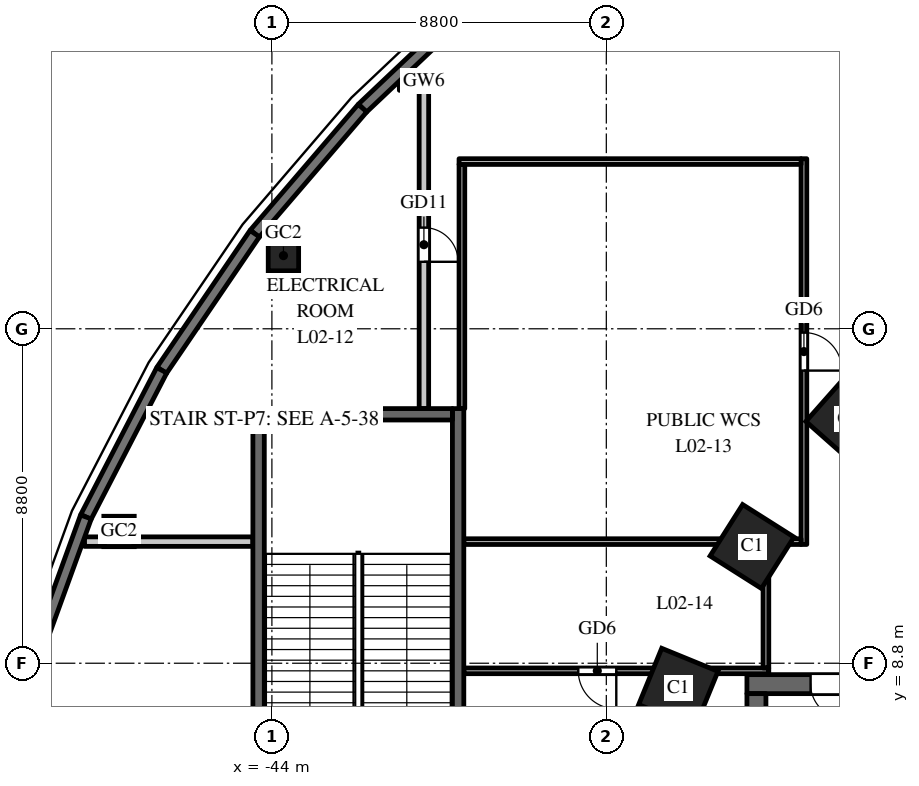
"""IFC4 building model, lengths in metres.
Left out: names, types, materials, properties, quantities, classifications, styles, units other than length and angle.
Written with IfcOpenShell. Run it as: python <this file> out.ifc"""

import sys

from ifc_helpers import new_model, si_unit, direction, frame, frame_2d, origin, origin_2d, place, context, subcontext, project, spatial, rectangle, hollow_rectangle, extrude, element, fill, save


model = new_model("IFC4")
c1 = context("Model", 3, precision=1e-05, world=origin(), true_north=direction((0.0, 1.0)))
c2 = subcontext(c1, "Body", "Model", "MODEL_VIEW")
j1 = project(units=[si_unit("LENGTHUNIT", "METRE"), si_unit("PLANEANGLEUNIT", "RADIAN")], contexts=[c1])
p1 = place(None, origin())
s1 = spatial("IfcSite", under=j1, at=p1, CompositionType="ELEMENT")
p2 = place(p1, origin())
s2 = spatial("IfcBuilding", under=s1, at=p2, CompositionType="ELEMENT")
p3 = place(p2, frame((0.0, 0.0, 13.5)))
s3 = spatial("IfcBuildingStorey", under=s2, at=p3, CompositionType="ELEMENT", Elevation=13.5)
for number, where, z_axis, x_axis in (
    (1, (-28.819, 15.23, 0.0), (0.0, 0.0, 1.0), (-0.663, -0.749, 0.0)),
    (2, (-31.365, 11.871, 0.0), (0.0, 0.0, 1.0), (-0.535, -0.845, 0.0)),
    (3, (-33.305, 8.149, 0.0), (0.0, 0.0, 1.0), (-0.379, -0.925, 0.0)),
):
    element("IfcColumn", number, at=place(p3, frame(where, z_axis=z_axis, x_axis=x_axis)), inside=s3, PredefinedType="COLUMN", context=c2, shape_type="SweptSolid", body=[
        extrude(rectangle(XDim=1.6, YDim=1.6, at=origin_2d()), origin(), (0.0, 0.0, 1.0), 6.0),
    ])
p4 = place(p3, frame((-16.5, 8.25, 0.0), z_axis=(0.0, 0.0, 1.0), x_axis=(-1.0, 0.0, 0.0)))
e4 = element("IfcWall", 4, at=p4, inside=s3, PredefinedType="SHEAR", context=c2, shape_type="SweptSolid", body=[
    extrude(rectangle(XDim=15.0, YDim=0.5, at=frame_2d((7.5, 0.0))), origin(), (0.0, 0.0, 1.0), 5.75),
])
p5 = place(p4, frame((6.9, 0.0, 0.0)))
e5 = element("IfcOpeningElement", 5, at=p5, cuts=e4, PredefinedType="OPENING", context=c2, shape_type="SweptSolid", body=[
    extrude(rectangle(XDim=1.2, YDim=2.1, at=frame_2d((0.6, 1.05))), frame((0.0, 0.26, 0.0), z_axis=(0.0, -1.0, 0.0), x_axis=(1.0, 0.0, 0.0)), (0.0, 0.0, 1.0), 0.52),
])
p6 = place(p4, frame((12.425, 0.0, 0.0)))
e6 = element("IfcOpeningElement", 6, at=p6, cuts=e4, PredefinedType="OPENING", context=c2, shape_type="SweptSolid", body=[
    extrude(rectangle(XDim=0.9, YDim=2.1, at=frame_2d((0.45, 1.05))), frame((0.0, 0.26, 0.0), z_axis=(0.0, -1.0, 0.0), x_axis=(1.0, 0.0, 0.0)), (0.0, 0.0, 1.0), 0.52),
])
p7 = place(p3, frame((-31.25, -8.0, 0.0), z_axis=(0.0, 0.0, 1.0), x_axis=(0.0, 1.0, 0.0)))
e7 = element("IfcWall", 7, at=p7, inside=s3, PredefinedType="SHEAR", context=c2, shape_type="SweptSolid", body=[
    extrude(rectangle(XDim=16.0, YDim=0.5, at=frame_2d((8.0, 0.0))), origin(), (0.0, 0.0, 1.0), 5.75),
])
for number, where, z_axis, x_axis in (
    (8, (-43.696, 19.525, 0.0), (0.0, 0.0, 1.0), (1.0, 0.0, 0.0)),
    (9, (-48.022, 12.267, 0.0), (0.0, 0.0, 1.0), (1.0, 0.0, 0.0)),
):
    element("IfcColumn", number, at=place(p3, frame(where, z_axis=z_axis, x_axis=x_axis)), inside=s3, PredefinedType="COLUMN", context=c2, shape_type="SweptSolid", body=[
        extrude(hollow_rectangle(XDim=0.8, YDim=0.8, WallThickness=0.04, at=origin_2d()), origin(), (0.0, 0.0, 1.0), 6.0),
    ])
p8 = place(p3, frame((-44.5, 12.0, 0.0), z_axis=(0.0, 0.0, 1.0), x_axis=(-1.0, 0.0, 0.0)))
e10 = element("IfcWall", 10, at=p8, inside=s3, PredefinedType="PARTITIONING", context=c2, shape_type="SweptSolid", body=[
    extrude(rectangle(XDim=4.43, YDim=0.25, at=frame_2d((2.215, 0.0))), origin(), (0.0, 0.0, 1.0), 5.15),
])
p9 = place(p3, frame((-40.646, 24.0, 0.0), z_axis=(0.0, 0.0, 1.0), x_axis=(1.0, 0.0, 0.0)))
e11 = element("IfcWall", 11, at=p9, inside=s3, PredefinedType="PARTITIONING", context=c2, shape_type="SweptSolid", body=[
    extrude(rectangle(XDim=0.521, YDim=0.25, at=frame_2d((0.26, 0.0))), origin(), (0.0, 0.0, 1.0), 5.75),
])
p10 = place(p3, frame((-40.0, 24.125, 0.0), z_axis=(0.0, 0.0, 1.0), x_axis=(0.0, -1.0, 0.0)))
e12 = element("IfcWall", 12, at=p10, inside=s3, PredefinedType="PARTITIONING", context=c2, shape_type="SweptSolid", body=[
    extrude(rectangle(XDim=8.625, YDim=0.25, at=frame_2d((4.312, 0.0))), origin(), (0.0, 0.0, 1.0), 4.75),
])
p11 = place(p10, frame((3.863, 0.0, 0.0)))
e13 = element("IfcOpeningElement", 13, at=p11, cuts=e12, PredefinedType="OPENING", context=c2, shape_type="SweptSolid", body=[
    extrude(rectangle(XDim=0.9, YDim=2.1, at=frame_2d((0.45, 1.05))), frame((0.0, 0.135, 0.0), z_axis=(0.0, -1.0, 0.0), x_axis=(1.0, 0.0, 0.0)), (0.0, 0.0, 1.0), 0.27),
])
p12 = place(p3, frame((-31.065, 12.0, 0.0), z_axis=(0.0, 0.0, 1.0), x_axis=(-1.0, 0.0, 0.0)))
e14 = element("IfcWall", 14, at=p12, inside=s3, PredefinedType="PARTITIONING", context=c2, shape_type="SweptSolid", body=[
    extrude(rectangle(XDim=7.885, YDim=0.15, at=frame_2d((3.942, 0.0))), origin(), (0.0, 0.0, 1.0), 5.75),
])
p13 = place(p3, frame((-30.0, 22.075, 0.0), z_axis=(0.0, 0.0, 1.0), x_axis=(0.0, -1.0, 0.0)))
e15 = element("IfcWall", 15, at=p13, inside=s3, PredefinedType="PARTITIONING", context=c2, shape_type="SweptSolid", body=[
    extrude(rectangle(XDim=10.15, YDim=0.15, at=frame_2d((5.075, 0.0))), origin(), (0.0, 0.0, 1.0), 4.75),
])
p14 = place(p13, frame((4.575, 0.0, 0.0)))
e16 = element("IfcOpeningElement", 16, at=p14, cuts=e15, PredefinedType="OPENING", context=c2, shape_type="SweptSolid", body=[
    extrude(rectangle(XDim=1.0, YDim=2.1, at=frame_2d((0.5, 1.05))), frame((0.0, 0.085, 0.0), z_axis=(0.0, -1.0, 0.0), x_axis=(1.0, 0.0, 0.0)), (0.0, 0.0, 1.0), 0.17),
])
p15 = place(p3, frame((-30.075, 12.0, 0.0), z_axis=(0.0, 0.0, 1.0), x_axis=(-1.0, 0.0, 0.0)))
e17 = element("IfcWall", 17, at=p15, inside=s3, PredefinedType="PARTITIONING", context=c2, shape_type="SweptSolid", body=[
    extrude(rectangle(XDim=0.86, YDim=0.15, at=frame_2d((0.43, 0.0))), origin(), (0.0, 0.0, 1.0), 5.75),
])
p16 = place(p3, frame((-39.0, 15.5, 0.0), z_axis=(0.0, 0.0, 1.0), x_axis=(0.0, 1.0, 0.0)))
e18 = element("IfcWall", 18, at=p16, inside=s3, PredefinedType="PARTITIONING", context=c2, shape_type="SweptSolid", body=[
    extrude(rectangle(XDim=6.425, YDim=0.15, at=frame_2d((3.212, 0.0))), origin(), (0.0, 0.0, 1.0), 4.75),
])
p17 = place(p3, frame((-39.075, 22.0, 0.0), z_axis=(0.0, 0.0, 1.0), x_axis=(1.0, 0.0, 0.0)))
e19 = element("IfcWall", 19, at=p17, inside=s3, PredefinedType="PARTITIONING", context=c2, shape_type="SweptSolid", body=[
    extrude(rectangle(XDim=9.0, YDim=0.15, at=frame_2d((4.5, 0.0))), origin(), (0.0, 0.0, 1.0), 4.75),
])
p18 = place(p3, frame((-30.925, 8.6, 0.0), z_axis=(0.0, 0.0, 1.0), x_axis=(-1.0, 0.0, 0.0)))
e20 = element("IfcWall", 20, at=p18, inside=s3, PredefinedType="PARTITIONING", context=c2, shape_type="SweptSolid", body=[
    extrude(rectangle(XDim=8.025, YDim=0.15, at=frame_2d((4.012, 0.0))), origin(), (0.0, 0.0, 1.0), 4.85),
])
p19 = place(p18, frame((4.012, 0.0, 0.0)))
e21 = element("IfcOpeningElement", 21, at=p19, cuts=e20, PredefinedType="OPENING", context=c2, shape_type="SweptSolid", body=[
    extrude(rectangle(XDim=1.0, YDim=2.1, at=frame_2d((0.5, 1.05))), frame((0.0, 0.085, 0.0), z_axis=(0.0, -1.0, 0.0), x_axis=(1.0, 0.0, 0.0)), (0.0, 0.0, 1.0), 0.17),
])
p20 = place(p3, frame((-31.0, 11.925, 0.0), z_axis=(0.0, 0.0, 1.0), x_axis=(0.0, -1.0, 0.0)))
e22 = element("IfcWall", 22, at=p20, inside=s3, PredefinedType="PARTITIONING", context=c2, shape_type="SweptSolid", body=[
    extrude(rectangle(XDim=3.25, YDim=0.15, at=frame_2d((1.625, 0.0))), origin(), (0.0, 0.0, 1.0), 5.75),
])
p21 = place(p3, frame((-38.453, 26.401, 0.0), z_axis=(0.0, 0.0, 1.0), x_axis=(-0.72620446032, -0.687478786444, 0.0)))
e23 = element("IfcWall", 23, at=p21, inside=s3, PredefinedType="SOLIDWALL", context=c2, shape_type="SweptSolid", body=[
    extrude(rectangle(XDim=4.356, YDim=0.3, at=frame_2d((2.178, 0.0))), origin(), (0.0, 0.0, 1.0), 5.75),
])
p22 = place(p21, frame((0.608, 0.0, 1.0)))
e24 = element("IfcOpeningElement", 24, at=p22, cuts=e23, PredefinedType="OPENING", context=c2, shape_type="SweptSolid", body=[
    extrude(rectangle(XDim=2.4, YDim=3.0, at=frame_2d((1.2, 1.5))), frame((0.0, 0.16, 0.0), z_axis=(0.0, -1.0, 0.0), x_axis=(1.0, 0.0, 0.0)), (0.0, 0.0, 1.0), 0.32),
])
p23 = place(p3, frame((-41.617, 23.406, 0.0), z_axis=(0.0, 0.0, 1.0), x_axis=(-0.651387059497, -0.758745608699, 0.0)))
e25 = element("IfcWall", 25, at=p23, inside=s3, PredefinedType="SOLIDWALL", context=c2, shape_type="SweptSolid", body=[
    extrude(rectangle(XDim=4.353, YDim=0.3, at=frame_2d((2.176, 0.0))), origin(), (0.0, 0.0, 1.0), 5.75),
])
p24 = place(p23, frame((0.976, 0.0, 1.0)))
e26 = element("IfcOpeningElement", 26, at=p24, cuts=e25, PredefinedType="OPENING", context=c2, shape_type="SweptSolid", body=[
    extrude(rectangle(XDim=2.4, YDim=3.0, at=frame_2d((1.2, 1.5))), frame((0.0, 0.16, 0.0), z_axis=(0.0, -1.0, 0.0), x_axis=(1.0, 0.0, 0.0)), (0.0, 0.0, 1.0), 0.32),
])
p25 = place(p3, frame((-44.452, 20.104, 0.0), z_axis=(0.0, 0.0, 1.0), x_axis=(-0.562667738859, -0.82668314102, 0.0)))
e27 = element("IfcWall", 27, at=p25, inside=s3, PredefinedType="SOLIDWALL", context=c2, shape_type="SweptSolid", body=[
    extrude(rectangle(XDim=4.349, YDim=0.3, at=frame_2d((2.174, 0.0))), origin(), (0.0, 0.0, 1.0), 5.75),
])
p26 = place(p25, frame((0.974, 0.0, 1.0)))
e28 = element("IfcOpeningElement", 28, at=p26, cuts=e27, PredefinedType="OPENING", context=c2, shape_type="SweptSolid", body=[
    extrude(rectangle(XDim=2.4, YDim=3.0, at=frame_2d((1.2, 1.5))), frame((0.0, 0.16, 0.0), z_axis=(0.0, -1.0, 0.0), x_axis=(1.0, 0.0, 0.0)), (0.0, 0.0, 1.0), 0.32),
])
p27 = place(p3, frame((-46.899, 16.508, 0.0), z_axis=(0.0, 0.0, 1.0), x_axis=(-0.459242531468, -0.888310923771, 0.0)))
e29 = element("IfcWall", 29, at=p27, inside=s3, PredefinedType="SOLIDWALL", context=c2, shape_type="SweptSolid", body=[
    extrude(rectangle(XDim=4.345, YDim=0.3, at=frame_2d((2.172, 0.0))), origin(), (0.0, 0.0, 1.0), 5.75),
])
p28 = place(p27, frame((0.972, 0.0, 1.0)))
e30 = element("IfcOpeningElement", 30, at=p28, cuts=e29, PredefinedType="OPENING", context=c2, shape_type="SweptSolid", body=[
    extrude(rectangle(XDim=2.4, YDim=3.0, at=frame_2d((1.2, 1.5))), frame((0.0, 0.16, 0.0), z_axis=(0.0, -1.0, 0.0), x_axis=(1.0, 0.0, 0.0)), (0.0, 0.0, 1.0), 0.32),
])
p29 = place(p3, frame((-48.894, 12.649, 0.0), z_axis=(0.0, 0.0, 1.0), x_axis=(-0.341286990045, -0.939959142956, 0.0)))
e31 = element("IfcWall", 31, at=p29, inside=s3, PredefinedType="SOLIDWALL", context=c2, shape_type="SweptSolid", body=[
    extrude(rectangle(XDim=4.342, YDim=0.3, at=frame_2d((2.171, 0.0))), origin(), (0.0, 0.0, 1.0), 5.75),
])
p30 = place(p29, frame((0.971, 0.0, 1.0)))
e32 = element("IfcOpeningElement", 32, at=p30, cuts=e31, PredefinedType="OPENING", context=c2, shape_type="SweptSolid", body=[
    extrude(rectangle(XDim=2.4, YDim=3.0, at=frame_2d((1.2, 1.5))), frame((0.0, 0.16, 0.0), z_axis=(0.0, -1.0, 0.0), x_axis=(1.0, 0.0, 0.0)), (0.0, 0.0, 1.0), 0.32),
])
for number, where, z_axis, x_axis in (
    (33, (-44.35, 4.5, 0.0), (0.0, 0.0, 1.0), (0.0, 1.0, 0.0)),
    (34, (-39.1, 4.5, 0.0), (0.0, 0.0, 1.0), (0.0, 1.0, 0.0)),
):
    element("IfcWall", number, at=place(p3, frame(where, z_axis=z_axis, x_axis=x_axis)), inside=s3, PredefinedType="SHEAR", context=c2, shape_type="SweptSolid", body=[
        extrude(rectangle(XDim=11.0, YDim=0.3, at=frame_2d((5.5, 0.0))), origin(), (0.0, 0.0, 1.0), 5.75),
    ])
p31 = place(p3, frame((-44.2, 15.35, 0.0), z_axis=(0.0, 0.0, 1.0), x_axis=(1.0, 0.0, 0.0)))
e35 = element("IfcWall", 35, at=p31, inside=s3, PredefinedType="SHEAR", context=c2, shape_type="SweptSolid", body=[
    extrude(rectangle(XDim=4.95, YDim=0.3, at=frame_2d((2.475, 0.0))), origin(), (0.0, 0.0, 1.0), 5.75),
])
p32 = place(p6, origin())
e36 = element("IfcDoor", 36, at=p32, inside=s3, OperationType="SINGLE_SWING_RIGHT", PredefinedType="DOOR", context=c2, shape_type="SweptSolid", body=[
    extrude(rectangle(XDim=0.9, YDim=2.1, at=frame_2d((0.45, 1.05))), frame((0.0, 0.025, 0.0), z_axis=(0.0, -1.0, 0.0), x_axis=(1.0, 0.0, 0.0)), (0.0, 0.0, 1.0), 0.05),
])
fill(e6, e36)
p33 = place(p11, origin())
e37 = element("IfcDoor", 37, at=p33, inside=s3, OperationType="SINGLE_SWING_RIGHT", PredefinedType="DOOR", context=c2, shape_type="SweptSolid", body=[
    extrude(rectangle(XDim=0.9, YDim=2.1, at=frame_2d((0.45, 1.05))), frame((0.0, 0.025, 0.0), z_axis=(0.0, -1.0, 0.0), x_axis=(1.0, 0.0, 0.0)), (0.0, 0.0, 1.0), 0.05),
])
fill(e13, e37)
p34 = place(p14, origin())
e38 = element("IfcDoor", 38, at=p34, inside=s3, OperationType="SINGLE_SWING_RIGHT", PredefinedType="DOOR", context=c2, shape_type="SweptSolid", body=[
    extrude(rectangle(XDim=1.0, YDim=2.1, at=frame_2d((0.5, 1.05))), frame((0.0, 0.025, 0.0), z_axis=(0.0, -1.0, 0.0), x_axis=(1.0, 0.0, 0.0)), (0.0, 0.0, 1.0), 0.05),
])
fill(e16, e38)
p35 = place(p19, origin())
e39 = element("IfcDoor", 39, at=p35, inside=s3, OperationType="SINGLE_SWING_LEFT", PredefinedType="DOOR", context=c2, shape_type="SweptSolid", body=[
    extrude(rectangle(XDim=1.0, YDim=2.1, at=frame_2d((0.5, 1.05))), frame((0.0, 0.025, 0.0), z_axis=(0.0, -1.0, 0.0), x_axis=(1.0, 0.0, 0.0)), (0.0, 0.0, 1.0), 0.05),
])
fill(e21, e39)
p36 = place(p22, origin())
e40 = element("IfcWindow", 40, at=p36, inside=s3, PartitioningType="SINGLE_PANEL", PredefinedType="WINDOW", context=c2, shape_type="SweptSolid", body=[
    extrude(rectangle(XDim=2.4, YDim=3.0, at=frame_2d((1.2, 1.5))), frame((0.0, 0.03, 0.0), z_axis=(0.0, -1.0, 0.0), x_axis=(1.0, 0.0, 0.0)), (0.0, 0.0, 1.0), 0.06),
])
fill(e24, e40)
p37 = place(p24, origin())
e41 = element("IfcWindow", 41, at=p37, inside=s3, PartitioningType="SINGLE_PANEL", PredefinedType="WINDOW", context=c2, shape_type="SweptSolid", body=[
    extrude(rectangle(XDim=2.4, YDim=3.0, at=frame_2d((1.2, 1.5))), frame((0.0, 0.03, 0.0), z_axis=(0.0, -1.0, 0.0), x_axis=(1.0, 0.0, 0.0)), (0.0, 0.0, 1.0), 0.06),
])
fill(e26, e41)
p38 = place(p26, origin())
e42 = element("IfcWindow", 42, at=p38, inside=s3, PartitioningType="SINGLE_PANEL", PredefinedType="WINDOW", context=c2, shape_type="SweptSolid", body=[
    extrude(rectangle(XDim=2.4, YDim=3.0, at=frame_2d((1.2, 1.5))), frame((0.0, 0.03, 0.0), z_axis=(0.0, -1.0, 0.0), x_axis=(1.0, 0.0, 0.0)), (0.0, 0.0, 1.0), 0.06),
])
fill(e28, e42)
p39 = place(p28, origin())
e43 = element("IfcWindow", 43, at=p39, inside=s3, PartitioningType="SINGLE_PANEL", PredefinedType="WINDOW", context=c2, shape_type="SweptSolid", body=[
    extrude(rectangle(XDim=2.4, YDim=3.0, at=frame_2d((1.2, 1.5))), frame((0.0, 0.03, 0.0), z_axis=(0.0, -1.0, 0.0), x_axis=(1.0, 0.0, 0.0)), (0.0, 0.0, 1.0), 0.06),
])
fill(e30, e43)
p40 = place(p30, origin())
e44 = element("IfcWindow", 44, at=p40, inside=s3, PartitioningType="SINGLE_PANEL", PredefinedType="WINDOW", context=c2, shape_type="SweptSolid", body=[
    extrude(rectangle(XDim=2.4, YDim=3.0, at=frame_2d((1.2, 1.5))), frame((0.0, 0.03, 0.0), z_axis=(0.0, -1.0, 0.0), x_axis=(1.0, 0.0, 0.0)), (0.0, 0.0, 1.0), 0.06),
])
fill(e32, e44)
save(model, sys.argv[1])
